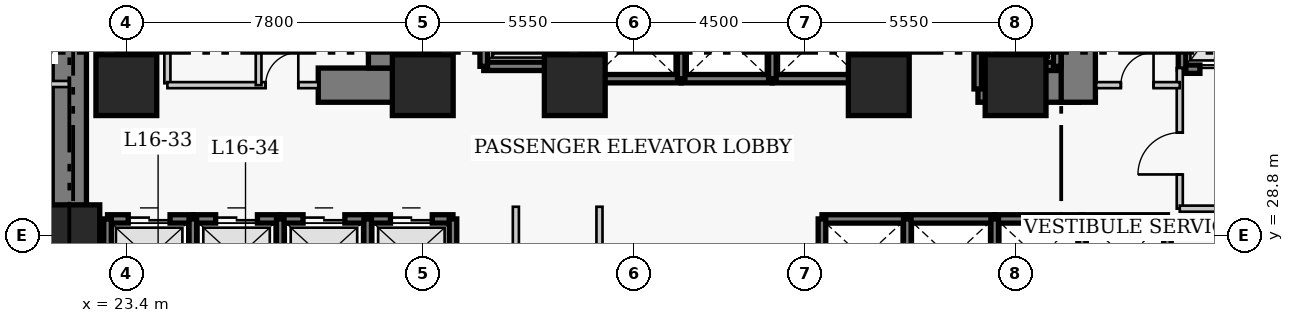
"""IFC4 building model, lengths in metres.
Left out: names, types, materials, properties, quantities, classifications, styles, units other than length and angle.
Written with IfcOpenShell. Run it as: python <this file> out.ifc"""

import sys

from ifc_helpers import new_model, si_unit, direction, frame, frame_2d, origin, origin_2d, place, context, subcontext, project, spatial, rectangle, extrude, element, fill, save


model = new_model("IFC4")
c1 = context("Model", 3, precision=1e-05, world=origin(), true_north=direction((0.0, 1.0)))
c2 = subcontext(c1, "Body", "Model", "MODEL_VIEW")
j1 = project(units=[si_unit("LENGTHUNIT", "METRE"), si_unit("PLANEANGLEUNIT", "RADIAN")], contexts=[c1])
p1 = place(None, origin())
s1 = spatial("IfcSite", under=j1, at=p1, CompositionType="ELEMENT")
p2 = place(p1, origin())
s2 = spatial("IfcBuilding", under=s1, at=p2, CompositionType="ELEMENT")
p3 = place(p2, frame((0.0, 0.0, 67.8)))
s3 = spatial("IfcBuildingStorey", under=s2, at=p3, CompositionType="ELEMENT", Elevation=67.8)
p4 = place(p3, frame((21.9, 27.05, 0.0), z_axis=(0.0, 0.0, 1.0), x_axis=(0.0, 1.0, 0.0)))
e1 = element("IfcWall", 1, at=p4, inside=s3, PredefinedType="SHEAR", context=c2, shape_type="SweptSolid", body=[
    extrude(rectangle(XDim=13.72, YDim=0.9, at=frame_2d((6.86, 0.0))), origin(), (0.0, 0.0, 1.0), 3.8),
])
p5 = place(p3, frame((28.45, 32.75, 0.0), z_axis=(0.0, 0.0, 1.0), x_axis=(1.0, 0.0, 0.0)))
e2 = element("IfcWall", 2, at=p5, inside=s3, PredefinedType="SHEAR", context=c2, shape_type="SweptSolid", body=[
    extrude(rectangle(XDim=2.4, YDim=0.9, at=frame_2d((1.2, 0.0))), origin(), (0.0, 0.0, 1.0), 3.8),
])
p6 = place(p3, frame((45.81, 32.75, 0.0), z_axis=(0.0, 0.0, 1.0), x_axis=(1.0, 0.0, 0.0)))
e3 = element("IfcWall", 3, at=p6, inside=s3, PredefinedType="SHEAR", context=c2, shape_type="SweptSolid", body=[
    extrude(rectangle(XDim=2.64, YDim=0.9, at=frame_2d((1.32, 0.0))), origin(), (0.0, 0.0, 1.0), 3.8),
])
p7 = place(p3, frame((30.22, 33.2, 0.0), z_axis=(0.0, 0.0, 1.0), x_axis=(0.0, 1.0, 0.0)))
e4 = element("IfcWall", 4, at=p7, inside=s3, PredefinedType="SHEAR", context=c2, shape_type="SweptSolid", body=[
    extrude(rectangle(XDim=7.12, YDim=0.9, at=frame_2d((3.56, 0.0))), origin(), (0.0, 0.0, 1.0), 3.8),
])
p8 = place(p3, frame((48.45, 32.3, 0.0), z_axis=(0.0, 0.0, 1.0), x_axis=(0.0, 1.0, 0.0)))
e5 = element("IfcWall", 5, at=p8, inside=s3, PredefinedType="SHEAR", context=c2, shape_type="SweptSolid", body=[
    extrude(rectangle(XDim=8.02, YDim=0.9, at=frame_2d((4.01, 0.0))), origin(), (0.0, 0.0, 1.0), 3.8),
])
p9 = place(p8, frame((5.9, 0.0, 0.0)))
e6 = element("IfcOpeningElement", 6, at=p9, cuts=e5, PredefinedType="OPENING", context=c2, shape_type="SweptSolid", body=[
    extrude(rectangle(XDim=1.1, YDim=2.15, at=frame_2d((0.55, 1.075))), frame((0.0, 0.46, 0.0), z_axis=(0.0, -1.0, 0.0), x_axis=(1.0, 0.0, 0.0)), (0.0, 0.0, 1.0), 0.92),
])
for number, where, z_axis, x_axis in (
    (7, (21.9, 28.8, 0.0), (0.0, 0.0, 1.0), (1.0, 0.0, 0.0)),
    (8, (23.4, 32.75, 0.0), (0.0, 0.0, 1.0), (1.0, 0.0, 0.0)),
    (9, (31.2, 32.75, 0.0), (0.0, 0.0, 1.0), (1.0, 0.0, 0.0)),
    (10, (35.2, 32.75, 0.0), (0.0, 0.0, 1.0), (1.0, 0.0, 0.0)),
    (11, (43.2, 32.75, 0.0), (0.0, 0.0, 1.0), (1.0, 0.0, 0.0)),
    (12, (46.8, 32.75, 0.0), (0.0, 0.0, 1.0), (1.0, 0.0, 0.0)),
):
    element("IfcColumn", number, at=place(p3, frame(where, z_axis=z_axis, x_axis=x_axis)), inside=s3, PredefinedType="COLUMN", context=c2, shape_type="SweptSolid", body=[
        extrude(rectangle(XDim=1.6, YDim=1.6, at=origin_2d()), origin(), (0.0, 0.0, 1.0), 3.8),
    ])
p10 = place(p3, frame((22.905, 29.23, 0.0), z_axis=(0.0, 0.0, 1.0), x_axis=(1.0, 0.0, 0.0)))
e13 = element("IfcWall", 13, at=p10, inside=s3, PredefinedType="SHEAR", context=c2, shape_type="SweptSolid", body=[
    extrude(rectangle(XDim=2.245, YDim=0.22, at=frame_2d((1.123, 0.0))), origin(), (0.0, 0.0, 1.0), 3.8),
])
p11 = place(p10, frame((0.545, 0.0, 0.0)))
e14 = element("IfcOpeningElement", 14, at=p11, cuts=e13, PredefinedType="OPENING", context=c2, shape_type="SweptSolid", body=[
    extrude(rectangle(XDim=1.1, YDim=2.15, at=frame_2d((0.55, 1.075))), frame((0.0, 0.12, 0.0), z_axis=(0.0, -1.0, 0.0), x_axis=(1.0, 0.0, 0.0)), (0.0, 0.0, 1.0), 0.24),
])
p12 = place(p3, frame((22.905, 27.17, 0.0), z_axis=(0.0, 0.0, 1.0), x_axis=(0.0, 1.0, 0.0)))
e15 = element("IfcWall", 15, at=p12, inside=s3, PredefinedType="SHEAR", context=c2, shape_type="SweptSolid", body=[
    extrude(rectangle(XDim=2.06, YDim=0.2, at=frame_2d((1.03, 0.0))), origin(), (0.0, 0.0, 1.0), 3.8),
])
p13 = place(p3, frame((25.15, 29.23, 0.0), z_axis=(0.0, 0.0, 1.0), x_axis=(1.0, 0.0, 0.0)))
e16 = element("IfcWall", 16, at=p13, inside=s3, PredefinedType="SHEAR", context=c2, shape_type="SweptSolid", body=[
    extrude(rectangle(XDim=2.3, YDim=0.22, at=frame_2d((1.15, 0.0))), origin(), (0.0, 0.0, 1.0), 3.8),
])
p14 = place(p13, frame((0.6, 0.0, 0.0)))
e17 = element("IfcOpeningElement", 17, at=p14, cuts=e16, PredefinedType="OPENING", context=c2, shape_type="SweptSolid", body=[
    extrude(rectangle(XDim=1.1, YDim=2.15, at=frame_2d((0.55, 1.075))), frame((0.0, 0.12, 0.0), z_axis=(0.0, -1.0, 0.0), x_axis=(1.0, 0.0, 0.0)), (0.0, 0.0, 1.0), 0.24),
])
p15 = place(p3, frame((25.15, 27.17, 0.0), z_axis=(0.0, 0.0, 1.0), x_axis=(0.0, 1.0, 0.0)))
e18 = element("IfcWall", 18, at=p15, inside=s3, PredefinedType="SHEAR", context=c2, shape_type="SweptSolid", body=[
    extrude(rectangle(XDim=2.06, YDim=0.2, at=frame_2d((1.03, 0.0))), origin(), (0.0, 0.0, 1.0), 3.8),
])
p16 = place(p3, frame((27.45, 29.23, 0.0), z_axis=(0.0, 0.0, 1.0), x_axis=(1.0, 0.0, 0.0)))
e19 = element("IfcWall", 19, at=p16, inside=s3, PredefinedType="SHEAR", context=c2, shape_type="SweptSolid", body=[
    extrude(rectangle(XDim=2.3, YDim=0.22, at=frame_2d((1.15, 0.0))), origin(), (0.0, 0.0, 1.0), 3.8),
])
p17 = place(p16, frame((0.6, 0.0, 0.0)))
e20 = element("IfcOpeningElement", 20, at=p17, cuts=e19, PredefinedType="OPENING", context=c2, shape_type="SweptSolid", body=[
    extrude(rectangle(XDim=1.1, YDim=2.15, at=frame_2d((0.55, 1.075))), frame((0.0, 0.12, 0.0), z_axis=(0.0, -1.0, 0.0), x_axis=(1.0, 0.0, 0.0)), (0.0, 0.0, 1.0), 0.24),
])
p18 = place(p3, frame((27.45, 27.17, 0.0), z_axis=(0.0, 0.0, 1.0), x_axis=(0.0, 1.0, 0.0)))
e21 = element("IfcWall", 21, at=p18, inside=s3, PredefinedType="SHEAR", context=c2, shape_type="SweptSolid", body=[
    extrude(rectangle(XDim=2.06, YDim=0.2, at=frame_2d((1.03, 0.0))), origin(), (0.0, 0.0, 1.0), 3.8),
])
p19 = place(p3, frame((29.75, 29.23, 0.0), z_axis=(0.0, 0.0, 1.0), x_axis=(1.0, 0.0, 0.0)))
e22 = element("IfcWall", 22, at=p19, inside=s3, PredefinedType="SHEAR", context=c2, shape_type="SweptSolid", body=[
    extrude(rectangle(XDim=2.245, YDim=0.22, at=frame_2d((1.123, 0.0))), origin(), (0.0, 0.0, 1.0), 3.8),
])
p20 = place(p19, frame((0.6, 0.0, 0.0)))
e23 = element("IfcOpeningElement", 23, at=p20, cuts=e22, PredefinedType="OPENING", context=c2, shape_type="SweptSolid", body=[
    extrude(rectangle(XDim=1.1, YDim=2.15, at=frame_2d((0.55, 1.075))), frame((0.0, 0.12, 0.0), z_axis=(0.0, -1.0, 0.0), x_axis=(1.0, 0.0, 0.0)), (0.0, 0.0, 1.0), 0.24),
])
for number, where, z_axis, x_axis in (
    (24, (29.75, 27.17, 0.0), (0.0, 0.0, 1.0), (0.0, 1.0, 0.0)),
    (25, (31.995, 27.17, 0.0), (0.0, 0.0, 1.0), (0.0, 1.0, 0.0)),
):
    element("IfcWall", number, at=place(p3, frame(where, z_axis=z_axis, x_axis=x_axis)), inside=s3, PredefinedType="SHEAR", context=c2, shape_type="SweptSolid", body=[
        extrude(rectangle(XDim=2.06, YDim=0.2, at=frame_2d((1.03, 0.0))), origin(), (0.0, 0.0, 1.0), 3.8),
    ])
p21 = place(p3, frame((41.705, 29.23, 0.0), z_axis=(0.0, 0.0, 1.0), x_axis=(1.0, 0.0, 0.0)))
e26 = element("IfcWall", 26, at=p21, inside=s3, PredefinedType="SHEAR", context=c2, shape_type="SweptSolid", body=[
    extrude(rectangle(XDim=2.245, YDim=0.22, at=frame_2d((1.123, 0.0))), origin(), (0.0, 0.0, 1.0), 3.8),
])
p22 = place(p3, frame((41.705, 27.17, 0.0), z_axis=(0.0, 0.0, 1.0), x_axis=(0.0, 1.0, 0.0)))
e27 = element("IfcWall", 27, at=p22, inside=s3, PredefinedType="SHEAR", context=c2, shape_type="SweptSolid", body=[
    extrude(rectangle(XDim=2.06, YDim=0.2, at=frame_2d((1.03, 0.0))), origin(), (0.0, 0.0, 1.0), 3.8),
])
p23 = place(p3, frame((43.95, 29.23, 0.0), z_axis=(0.0, 0.0, 1.0), x_axis=(1.0, 0.0, 0.0)))
e28 = element("IfcWall", 28, at=p23, inside=s3, PredefinedType="SHEAR", context=c2, shape_type="SweptSolid", body=[
    extrude(rectangle(XDim=2.3, YDim=0.22, at=frame_2d((1.15, 0.0))), origin(), (0.0, 0.0, 1.0), 3.8),
])
p24 = place(p3, frame((43.95, 27.17, 0.0), z_axis=(0.0, 0.0, 1.0), x_axis=(0.0, 1.0, 0.0)))
e29 = element("IfcWall", 29, at=p24, inside=s3, PredefinedType="SHEAR", context=c2, shape_type="SweptSolid", body=[
    extrude(rectangle(XDim=2.06, YDim=0.2, at=frame_2d((1.03, 0.0))), origin(), (0.0, 0.0, 1.0), 3.8),
])
p25 = place(p3, frame((46.25, 29.23, 0.0), z_axis=(0.0, 0.0, 1.0), x_axis=(1.0, 0.0, 0.0)))
e30 = element("IfcWall", 30, at=p25, inside=s3, PredefinedType="SHEAR", context=c2, shape_type="SweptSolid", body=[
    extrude(rectangle(XDim=2.3, YDim=0.22, at=frame_2d((1.15, 0.0))), origin(), (0.0, 0.0, 1.0), 3.8),
])
p26 = place(p3, frame((46.25, 27.17, 0.0), z_axis=(0.0, 0.0, 1.0), x_axis=(0.0, 1.0, 0.0)))
e31 = element("IfcWall", 31, at=p26, inside=s3, PredefinedType="SHEAR", context=c2, shape_type="SweptSolid", body=[
    extrude(rectangle(XDim=2.06, YDim=0.2, at=frame_2d((1.03, 0.0))), origin(), (0.0, 0.0, 1.0), 3.8),
])
p27 = place(p3, frame((48.55, 29.23, 0.0), z_axis=(0.0, 0.0, 1.0), x_axis=(1.0, 0.0, 0.0)))
e32 = element("IfcWall", 32, at=p27, inside=s3, PredefinedType="SHEAR", context=c2, shape_type="SweptSolid", body=[
    extrude(rectangle(XDim=2.245, YDim=0.22, at=frame_2d((1.123, 0.0))), origin(), (0.0, 0.0, 1.0), 3.8),
])
for number, where, z_axis, x_axis in (
    (33, (48.55, 27.17, 0.0), (0.0, 0.0, 1.0), (0.0, 1.0, 0.0)),
    (34, (50.795, 27.17, 0.0), (0.0, 0.0, 1.0), (0.0, 1.0, 0.0)),
):
    element("IfcWall", number, at=place(p3, frame(where, z_axis=z_axis, x_axis=x_axis)), inside=s3, PredefinedType="SHEAR", context=c2, shape_type="SweptSolid", body=[
        extrude(rectangle(XDim=2.06, YDim=0.2, at=frame_2d((1.03, 0.0))), origin(), (0.0, 0.0, 1.0), 3.8),
    ])
p28 = place(p3, frame((35.68, 32.92, 0.0), z_axis=(0.0, 0.0, 1.0), x_axis=(1.0, 0.0, 0.0)))
e35 = element("IfcWall", 35, at=p28, inside=s3, PredefinedType="SHEAR", context=c2, shape_type="SweptSolid", body=[
    extrude(rectangle(XDim=2.32, YDim=0.22, at=frame_2d((1.16, 0.0))), origin(), (0.0, 0.0, 1.0), 3.8),
])
p29 = place(p3, frame((35.68, 32.92, 0.0), z_axis=(0.0, 0.0, 1.0), x_axis=(0.0, 1.0, 0.0)))
e36 = element("IfcWall", 36, at=p29, inside=s3, PredefinedType="SHEAR", context=c2, shape_type="SweptSolid", body=[
    extrude(rectangle(XDim=2.16, YDim=0.2, at=frame_2d((1.08, 0.0))), origin(), (0.0, 0.0, 1.0), 3.8),
])
p30 = place(p3, frame((38.0, 32.92, 0.0), z_axis=(0.0, 0.0, 1.0), x_axis=(1.0, 0.0, 0.0)))
e37 = element("IfcWall", 37, at=p30, inside=s3, PredefinedType="SHEAR", context=c2, shape_type="SweptSolid", body=[
    extrude(rectangle(XDim=2.4, YDim=0.22, at=frame_2d((1.2, 0.0))), origin(), (0.0, 0.0, 1.0), 3.8),
])
p31 = place(p3, frame((38.0, 32.92, 0.0), z_axis=(0.0, 0.0, 1.0), x_axis=(0.0, 1.0, 0.0)))
e38 = element("IfcWall", 38, at=p31, inside=s3, PredefinedType="SHEAR", context=c2, shape_type="SweptSolid", body=[
    extrude(rectangle(XDim=2.16, YDim=0.2, at=frame_2d((1.08, 0.0))), origin(), (0.0, 0.0, 1.0), 3.8),
])
p32 = place(p3, frame((40.4, 32.92, 0.0), z_axis=(0.0, 0.0, 1.0), x_axis=(1.0, 0.0, 0.0)))
e39 = element("IfcWall", 39, at=p32, inside=s3, PredefinedType="SHEAR", context=c2, shape_type="SweptSolid", body=[
    extrude(rectangle(XDim=2.32, YDim=0.22, at=frame_2d((1.16, 0.0))), origin(), (0.0, 0.0, 1.0), 3.8),
])
for number, where, z_axis, x_axis in (
    (40, (40.4, 32.92, 0.0), (0.0, 0.0, 1.0), (0.0, 1.0, 0.0)),
    (41, (42.72, 32.92, 0.0), (0.0, 0.0, 1.0), (0.0, 1.0, 0.0)),
):
    element("IfcWall", number, at=place(p3, frame(where, z_axis=z_axis, x_axis=x_axis)), inside=s3, PredefinedType="SHEAR", context=c2, shape_type="SweptSolid", body=[
        extrude(rectangle(XDim=2.16, YDim=0.2, at=frame_2d((1.08, 0.0))), origin(), (0.0, 0.0, 1.0), 3.8),
    ])
p33 = place(p3, frame((51.18, 33.17, 0.0), z_axis=(0.0, 0.0, 1.0), x_axis=(1.0, 0.0, 0.0)))
e42 = element("IfcWall", 42, at=p33, inside=s3, PredefinedType="SHEAR", context=c2, shape_type="SweptSolid", body=[
    extrude(rectangle(XDim=2.42, YDim=0.22, at=frame_2d((1.21, 0.0))), origin(), (0.0, 0.0, 1.0), 3.8),
])
p34 = place(p33, frame((0.47, 0.0, 0.0)))
e43 = element("IfcOpeningElement", 43, at=p34, cuts=e42, PredefinedType="OPENING", context=c2, shape_type="SweptSolid", body=[
    extrude(rectangle(XDim=1.3, YDim=2.15, at=frame_2d((0.65, 1.075))), frame((0.0, 0.12, 0.0), z_axis=(0.0, -1.0, 0.0), x_axis=(1.0, 0.0, 0.0)), (0.0, 0.0, 1.0), 0.24),
])
p35 = place(p3, frame((51.18, 33.17, 0.0), z_axis=(0.0, 0.0, 1.0), x_axis=(0.0, 1.0, 0.0)))
e44 = element("IfcWall", 44, at=p35, inside=s3, PredefinedType="SHEAR", context=c2, shape_type="SweptSolid", body=[
    extrude(rectangle(XDim=2.86, YDim=0.2, at=frame_2d((1.43, 0.0))), origin(), (0.0, 0.0, 1.0), 3.8),
])
p36 = place(p3, frame((32.805, 33.245, 0.0), z_axis=(0.0, 0.0, 1.0), x_axis=(1.0, 0.0, 0.0)))
e45 = element("IfcWall", 45, at=p36, inside=s3, PredefinedType="SHEAR", context=c2, shape_type="SweptSolid", body=[
    extrude(rectangle(XDim=2.09, YDim=0.22, at=frame_2d((1.045, 0.0))), origin(), (0.0, 0.0, 1.0), 3.8),
])
for number, where, z_axis, x_axis in (
    (46, (32.805, 33.245, 0.0), (0.0, 0.0, 1.0), (0.0, 1.0, 0.0)),
    (47, (34.895, 33.245, 0.0), (0.0, 0.0, 1.0), (0.0, 1.0, 0.0)),
):
    element("IfcWall", number, at=place(p3, frame(where, z_axis=z_axis, x_axis=x_axis)), inside=s3, PredefinedType="SHEAR", context=c2, shape_type="SweptSolid", body=[
        extrude(rectangle(XDim=2.91, YDim=0.2, at=frame_2d((1.455, 0.0))), origin(), (0.0, 0.0, 1.0), 3.8),
    ])
p37 = place(p3, frame((45.805, 33.245, 0.0), z_axis=(0.0, 0.0, 1.0), x_axis=(1.0, 0.0, 0.0)))
e48 = element("IfcWall", 48, at=p37, inside=s3, PredefinedType="SHEAR", context=c2, shape_type="SweptSolid", body=[
    extrude(rectangle(XDim=2.09, YDim=0.22, at=frame_2d((1.045, 0.0))), origin(), (0.0, 0.0, 1.0), 3.8),
])
p38 = place(p3, frame((45.805, 32.65, 0.0), z_axis=(0.0, 0.0, 1.0), x_axis=(0.0, 1.0, 0.0)))
e49 = element("IfcWall", 49, at=p38, inside=s3, PredefinedType="SHEAR", context=c2, shape_type="SweptSolid", body=[
    extrude(rectangle(XDim=3.505, YDim=0.2, at=frame_2d((1.752, 0.0))), origin(), (0.0, 0.0, 1.0), 3.8),
])
p39 = place(p3, frame((47.895, 33.245, 0.0), z_axis=(0.0, 0.0, 1.0), x_axis=(0.0, 1.0, 0.0)))
e50 = element("IfcWall", 50, at=p39, inside=s3, PredefinedType="SHEAR", context=c2, shape_type="SweptSolid", body=[
    extrude(rectangle(XDim=2.91, YDim=0.2, at=frame_2d((1.455, 0.0))), origin(), (0.0, 0.0, 1.0), 3.8),
])
p40 = place(p3, frame((24.48, 32.8, 0.0), z_axis=(0.0, 0.0, 1.0), x_axis=(0.0, 1.0, 0.0)))
e51 = element("IfcWall", 51, at=p40, inside=s3, PredefinedType="PARTITIONING", context=c2, shape_type="SweptSolid", body=[
    extrude(rectangle(XDim=3.57, YDim=0.16, at=frame_2d((1.785, 0.0))), origin(), (0.0, 0.0, 1.0), 3.54),
])
p41 = place(p40, frame((1.604, 0.0, 0.0)))
e52 = element("IfcOpeningElement", 52, at=p41, cuts=e51, PredefinedType="OPENING", context=c2, shape_type="SweptSolid", body=[
    extrude(rectangle(XDim=0.9, YDim=2.1, at=frame_2d((0.45, 1.05))), frame((0.0, 0.09, 0.0), z_axis=(0.0, -1.0, 0.0), x_axis=(1.0, 0.0, 0.0)), (0.0, 0.0, 1.0), 0.18),
])
p42 = place(p3, frame((51.12, 29.5, 0.0), z_axis=(0.0, 0.0, 1.0), x_axis=(0.0, 1.0, 0.0)))
e53 = element("IfcWall", 53, at=p42, inside=s3, PredefinedType="PARTITIONING", context=c2, shape_type="SweptSolid", body=[
    extrude(rectangle(XDim=3.7, YDim=0.16, at=frame_2d((1.85, 0.0))), origin(), (0.0, 0.0, 1.0), 3.54),
])
p43 = place(p42, frame((0.9, 0.0, 0.0)))
e54 = element("IfcOpeningElement", 54, at=p43, cuts=e53, PredefinedType="OPENING", context=c2, shape_type="SweptSolid", body=[
    extrude(rectangle(XDim=1.1, YDim=2.15, at=frame_2d((0.55, 1.075))), frame((0.0, 0.09, 0.0), z_axis=(0.0, -1.0, 0.0), x_axis=(1.0, 0.0, 0.0)), (0.0, 0.0, 1.0), 0.18),
])
p44 = place(p3, frame((51.12, 29.5, 0.0), z_axis=(0.0, 0.0, 1.0), x_axis=(1.0, 0.0, 0.0)))
e55 = element("IfcWall", 55, at=p44, inside=s3, PredefinedType="PARTITIONING", context=c2, shape_type="SweptSolid", body=[
    extrude(rectangle(XDim=5.63, YDim=0.16, at=frame_2d((2.815, 0.0))), origin(), (0.0, 0.0, 1.0), 3.54),
])
p45 = place(p3, frame((24.48, 32.75, 0.0), z_axis=(0.0, 0.0, 1.0), x_axis=(1.0, 0.0, 0.0)))
e56 = element("IfcWall", 56, at=p45, inside=s3, PredefinedType="PARTITIONING", context=c2, shape_type="SweptSolid", body=[
    extrude(rectangle(XDim=3.97, YDim=0.16, at=frame_2d((1.985, 0.0))), origin(), (0.0, 0.0, 1.0), 3.54),
])
p46 = place(p45, frame((2.585, 0.0, 0.0)))
e57 = element("IfcOpeningElement", 57, at=p46, cuts=e56, PredefinedType="OPENING", context=c2, shape_type="SweptSolid", body=[
    extrude(rectangle(XDim=0.86, YDim=2.05, at=frame_2d((0.43, 1.025))), frame((0.0, 0.09, 0.0), z_axis=(0.0, -1.0, 0.0), x_axis=(1.0, 0.0, 0.0)), (0.0, 0.0, 1.0), 0.18),
])
p47 = place(p3, frame((48.92, 32.75, 0.0), z_axis=(0.0, 0.0, 1.0), x_axis=(1.0, 0.0, 0.0)))
e58 = element("IfcWall", 58, at=p47, inside=s3, PredefinedType="PARTITIONING", context=c2, shape_type="SweptSolid", body=[
    extrude(rectangle(XDim=2.2, YDim=0.16, at=frame_2d((1.1, 0.0))), origin(), (0.0, 0.0, 1.0), 3.54),
])
p48 = place(p47, frame((0.65, 0.0, 0.0)))
e59 = element("IfcOpeningElement", 59, at=p48, cuts=e58, PredefinedType="OPENING", context=c2, shape_type="SweptSolid", body=[
    extrude(rectangle(XDim=0.86, YDim=2.05, at=frame_2d((0.43, 1.025))), frame((0.0, 0.09, 0.0), z_axis=(0.0, -1.0, 0.0), x_axis=(1.0, 0.0, 0.0)), (0.0, 0.0, 1.0), 0.18),
])
p49 = place(p3, frame((26.88, 32.75, 0.0), z_axis=(0.0, 0.0, 1.0), x_axis=(0.0, 1.0, 0.0)))
e60 = element("IfcWall", 60, at=p49, inside=s3, PredefinedType="PARTITIONING", context=c2, shape_type="SweptSolid", body=[
    extrude(rectangle(XDim=3.62, YDim=0.15, at=frame_2d((1.81, 0.0))), origin(), (0.0, 0.0, 1.0), 3.54),
])
for number, where, z_axis, x_axis in (
    (61, (33.65, 26.26, 0.0), (0.0, 0.0, 1.0), (0.0, 1.0, 0.0)),
    (62, (35.85, 26.26, 0.0), (0.0, 0.0, 1.0), (0.0, 1.0, 0.0)),
):
    element("IfcWall", number, at=place(p3, frame(where, z_axis=z_axis, x_axis=x_axis)), inside=s3, PredefinedType="PARTITIONING", context=c2, shape_type="SweptSolid", body=[
        extrude(rectangle(XDim=3.29, YDim=0.16, at=frame_2d((1.645, 0.0))), origin(), (0.0, 0.0, 1.0), 3.54),
    ])
p50 = place(p3, frame((20.46, 32.78, 0.0), z_axis=(0.0, 0.0, 1.0), x_axis=(1.0, 0.0, 0.0)))
e63 = element("IfcWall", 63, at=p50, inside=s3, PredefinedType="PARTITIONING", context=c2, shape_type="SweptSolid", body=[
    extrude(rectangle(XDim=1.44, YDim=0.16, at=frame_2d((0.72, 0.0))), origin(), (0.0, 0.0, 1.0), 3.54),
])
p51 = place(p11, origin())
e64 = element("IfcDoor", 64, at=p51, inside=s3, OperationType="DOUBLE_DOOR_SLIDING", PredefinedType="DOOR", context=c2, shape_type="SweptSolid", body=[
    extrude(rectangle(XDim=1.1, YDim=2.15, at=frame_2d((0.55, 1.075))), frame((0.0, 0.025, 0.0), z_axis=(0.0, -1.0, 0.0), x_axis=(1.0, 0.0, 0.0)), (0.0, 0.0, 1.0), 0.05),
])
fill(e14, e64)
p52 = place(p14, origin())
e65 = element("IfcDoor", 65, at=p52, inside=s3, OperationType="DOUBLE_DOOR_SLIDING", PredefinedType="DOOR", context=c2, shape_type="SweptSolid", body=[
    extrude(rectangle(XDim=1.1, YDim=2.15, at=frame_2d((0.55, 1.075))), frame((0.0, 0.025, 0.0), z_axis=(0.0, -1.0, 0.0), x_axis=(1.0, 0.0, 0.0)), (0.0, 0.0, 1.0), 0.05),
])
fill(e17, e65)
p53 = place(p17, origin())
e66 = element("IfcDoor", 66, at=p53, inside=s3, OperationType="DOUBLE_DOOR_SLIDING", PredefinedType="DOOR", context=c2, shape_type="SweptSolid", body=[
    extrude(rectangle(XDim=1.1, YDim=2.15, at=frame_2d((0.55, 1.075))), frame((0.0, 0.025, 0.0), z_axis=(0.0, -1.0, 0.0), x_axis=(1.0, 0.0, 0.0)), (0.0, 0.0, 1.0), 0.05),
])
fill(e20, e66)
p54 = place(p20, origin())
e67 = element("IfcDoor", 67, at=p54, inside=s3, OperationType="DOUBLE_DOOR_SLIDING", PredefinedType="DOOR", context=c2, shape_type="SweptSolid", body=[
    extrude(rectangle(XDim=1.1, YDim=2.15, at=frame_2d((0.55, 1.075))), frame((0.0, 0.025, 0.0), z_axis=(0.0, -1.0, 0.0), x_axis=(1.0, 0.0, 0.0)), (0.0, 0.0, 1.0), 0.05),
])
fill(e23, e67)
p55 = place(p34, origin())
e68 = element("IfcDoor", 68, at=p55, inside=s3, OperationType="DOUBLE_DOOR_SLIDING", PredefinedType="DOOR", context=c2, shape_type="SweptSolid", body=[
    extrude(rectangle(XDim=1.3, YDim=2.15, at=frame_2d((0.65, 1.075))), frame((0.0, 0.025, 0.0), z_axis=(0.0, -1.0, 0.0), x_axis=(1.0, 0.0, 0.0)), (0.0, 0.0, 1.0), 0.05),
])
fill(e43, e68)
p56 = place(p43, origin())
e69 = element("IfcDoor", 69, at=p56, inside=s3, OperationType="SINGLE_SWING_LEFT", PredefinedType="DOOR", context=c2, shape_type="SweptSolid", body=[
    extrude(rectangle(XDim=1.1, YDim=2.15, at=frame_2d((0.55, 1.075))), frame((0.0, 0.025, 0.0), z_axis=(0.0, -1.0, 0.0), x_axis=(1.0, 0.0, 0.0)), (0.0, 0.0, 1.0), 0.05),
])
fill(e54, e69)
p57 = place(p46, origin())
e70 = element("IfcDoor", 70, at=p57, inside=s3, OperationType="SINGLE_SWING_RIGHT", PredefinedType="DOOR", context=c2, shape_type="SweptSolid", body=[
    extrude(rectangle(XDim=0.86, YDim=2.05, at=frame_2d((0.43, 1.025))), frame((0.0, 0.025, 0.0), z_axis=(0.0, -1.0, 0.0), x_axis=(1.0, 0.0, 0.0)), (0.0, 0.0, 1.0), 0.05),
])
fill(e57, e70)
p58 = place(p48, origin())
e71 = element("IfcDoor", 71, at=p58, inside=s3, OperationType="SINGLE_SWING_RIGHT", PredefinedType="DOOR", context=c2, shape_type="SweptSolid", body=[
    extrude(rectangle(XDim=0.86, YDim=2.05, at=frame_2d((0.43, 1.025))), frame((0.0, 0.025, 0.0), z_axis=(0.0, -1.0, 0.0), x_axis=(1.0, 0.0, 0.0)), (0.0, 0.0, 1.0), 0.05),
])
fill(e59, e71)
save(model, sys.argv[1])
